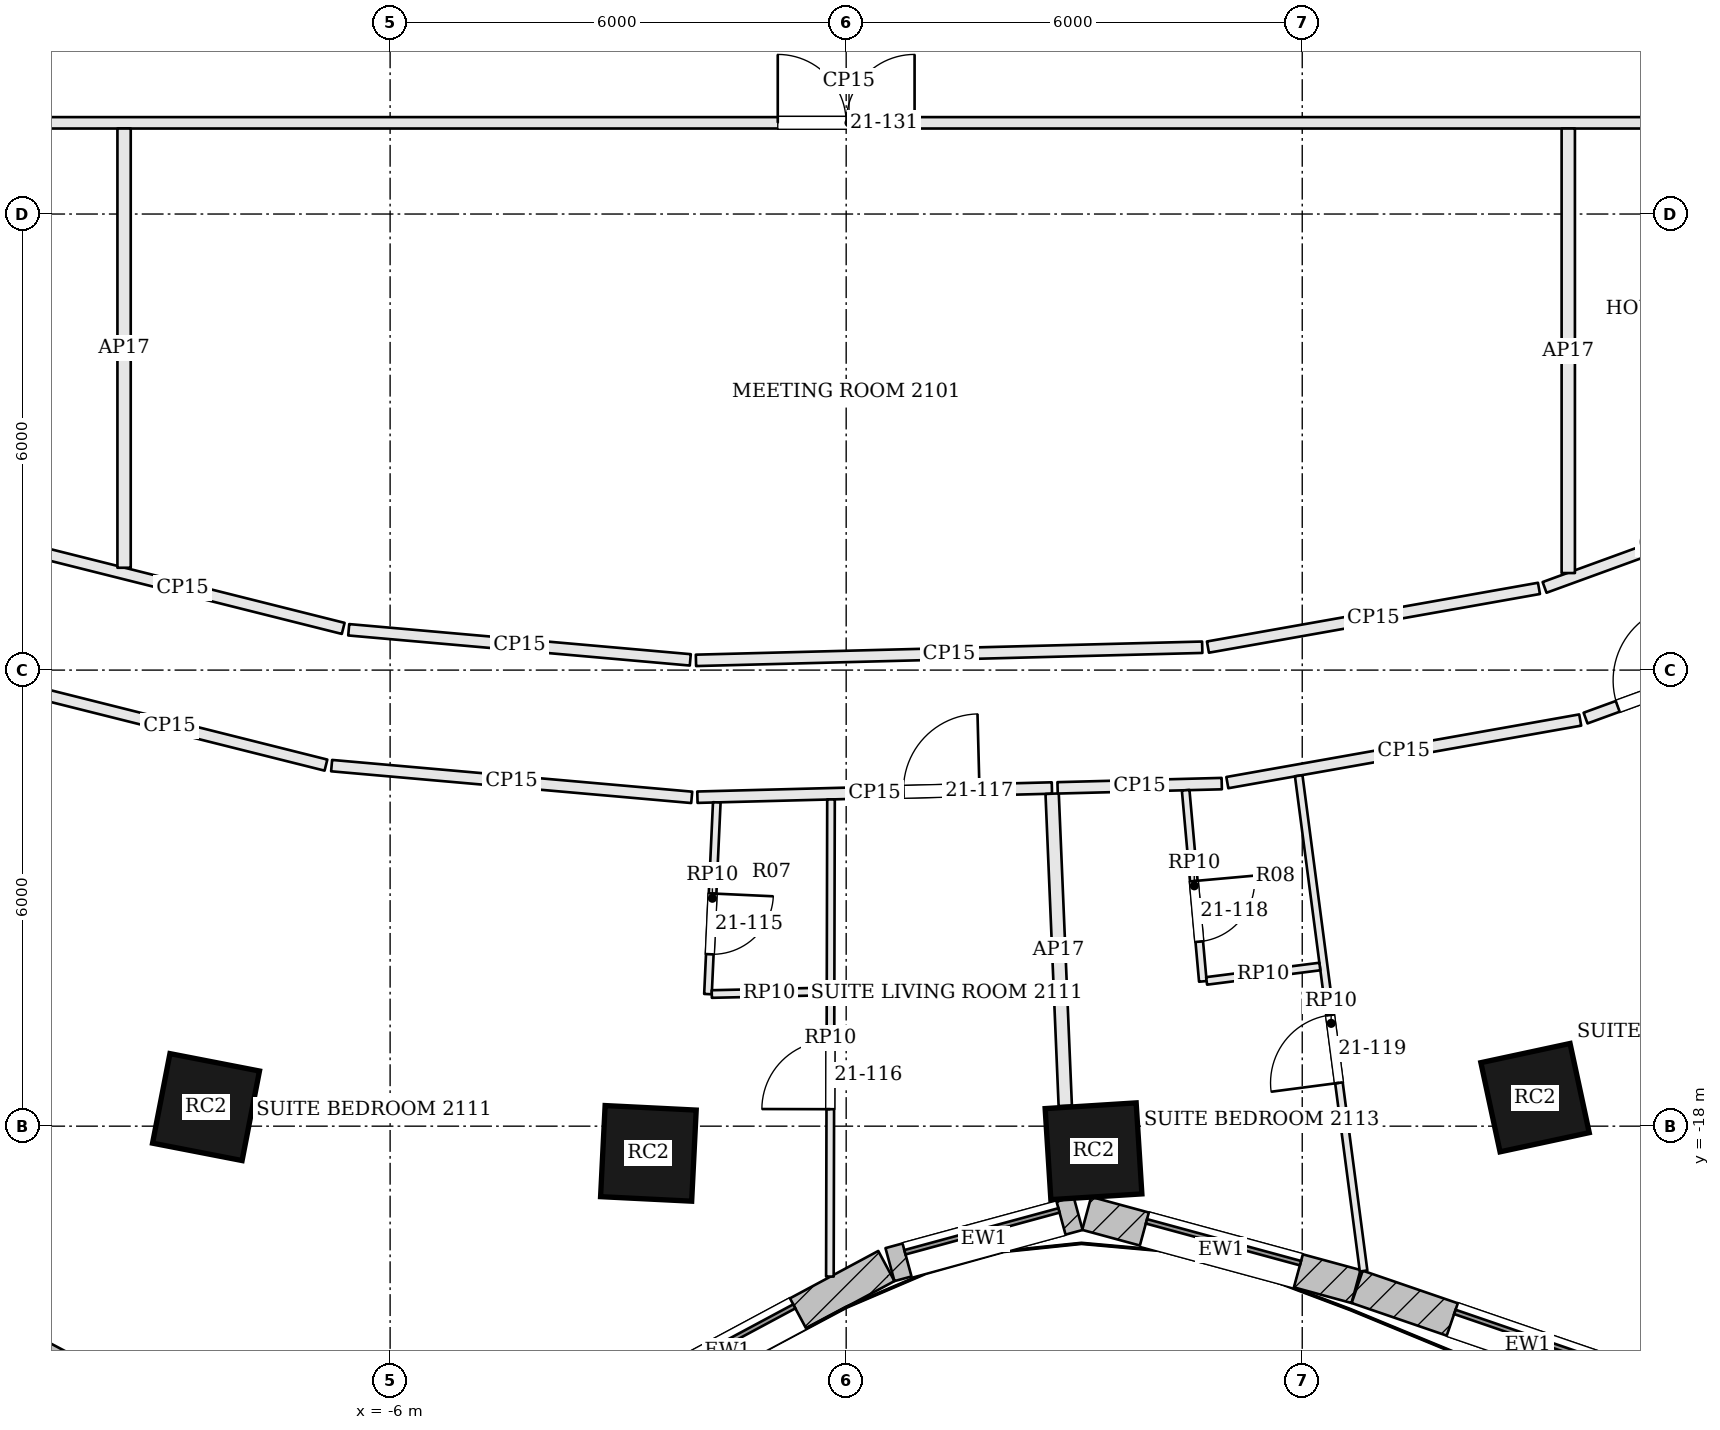
"""IFC4 building model, lengths in metres.
Left out: names, types, materials, properties, quantities, classifications, styles, units other than length and angle.
Written with IfcOpenShell. Run it as: python <this file> out.ifc"""

import sys

from ifc_helpers import new_model, si_unit, direction, frame, frame_2d, origin, origin_2d, place, context, subcontext, project, spatial, rectangle, extrude, element, fill, save


model = new_model("IFC4")
c1 = context("Model", 3, precision=1e-05, world=origin(), true_north=direction((0.0, 1.0)))
c2 = subcontext(c1, "Body", "Model", "MODEL_VIEW")
j1 = project(units=[si_unit("LENGTHUNIT", "METRE"), si_unit("PLANEANGLEUNIT", "RADIAN")], contexts=[c1])
p1 = place(None, origin())
s1 = spatial("IfcSite", under=j1, at=p1, CompositionType="ELEMENT")
p2 = place(p1, origin())
s2 = spatial("IfcBuilding", under=s1, at=p2, CompositionType="ELEMENT")
p3 = place(p2, frame((0.0, 0.0, 92.4)))
s3 = spatial("IfcBuildingStorey", under=s2, at=p3, CompositionType="ELEMENT", Elevation=92.4)
for number, where, z_axis, x_axis in (
    (1, (-8.422, -17.749, 0.0), (0.0, 0.0, 1.0), (0.982, -0.191, 0.0)),
    (2, (-2.602, -18.358, 0.0), (0.0, 0.0, 1.0), (0.999, -0.05, 0.0)),
    (3, (3.254, -18.33, 0.0), (0.0, 0.0, 1.0), (0.998, 0.063, 0.0)),
    (4, (9.063, -17.625, 0.0), (0.0, 0.0, 1.0), (0.978, 0.21, 0.0)),
):
    element("IfcColumn", number, at=place(p3, frame(where, z_axis=z_axis, x_axis=x_axis)), inside=s3, PredefinedType="COLUMN", context=c2, shape_type="SweptSolid", body=[
        extrude(rectangle(XDim=1.2, YDim=1.2, at=origin_2d()), origin(), (0.0, 0.0, 1.0), 3.6),
    ])
p4 = place(p3, frame((-10.693, -20.993, 0.0), z_axis=(0.0, 0.0, 1.0), x_axis=(0.883817790726, -0.46783128668, 0.0)))
e5 = element("IfcWall", 5, at=p4, inside=s3, PredefinedType="SOLIDWALL", context=c2, shape_type="SweptSolid", body=[
    extrude(rectangle(XDim=3.777, YDim=0.45, at=frame_2d((1.888, 0.0))), origin(), (0.0, 0.0, 1.0), 3.4),
])
p5 = place(p4, frame((0.838, 0.0, 0.9)))
e6 = element("IfcOpeningElement", 6, at=p5, cuts=e5, PredefinedType="OPENING", context=c2, shape_type="SweptSolid", body=[
    extrude(rectangle(XDim=2.1, YDim=2.0, at=frame_2d((1.05, 1.0))), frame((0.0, 0.235, 0.0), z_axis=(0.0, -1.0, 0.0), x_axis=(1.0, 0.0, 0.0)), (0.0, 0.0, 1.0), 0.47),
])
p6 = place(p3, frame((-3.646, -22.079, 0.0), z_axis=(0.0, 0.0, 1.0), x_axis=(0.881279133897, 0.472596115259, 0.0)))
e7 = element("IfcWall", 7, at=p6, inside=s3, PredefinedType="SOLIDWALL", context=c2, shape_type="SweptSolid", body=[
    extrude(rectangle(XDim=4.737, YDim=0.45, at=frame_2d((2.368, 0.0))), origin(), (0.0, 0.0, 1.0), 3.4),
])
p7 = place(p6, frame((1.318, 0.0, 0.9)))
e8 = element("IfcOpeningElement", 8, at=p7, cuts=e7, PredefinedType="OPENING", context=c2, shape_type="SweptSolid", body=[
    extrude(rectangle(XDim=2.1, YDim=2.0, at=frame_2d((1.05, 1.0))), frame((0.0, 0.235, 0.0), z_axis=(0.0, -1.0, 0.0), x_axis=(1.0, 0.0, 0.0)), (0.0, 0.0, 1.0), 0.47),
])
p8 = place(p3, frame((0.576, -19.821, 0.0), z_axis=(0.0, 0.0, 1.0), x_axis=(0.965009398019, 0.262215296532, 0.0)))
e9 = element("IfcWall", 9, at=p8, inside=s3, PredefinedType="SOLIDWALL", context=c2, shape_type="SweptSolid", body=[
    extrude(rectangle(XDim=2.565, YDim=0.45, at=frame_2d((1.283, 0.0))), origin(), (0.0, 0.0, 1.0), 3.4),
])
p9 = place(p8, frame((0.233, 0.0, 0.9)))
e10 = element("IfcOpeningElement", 10, at=p9, cuts=e9, PredefinedType="OPENING", context=c2, shape_type="SweptSolid", body=[
    extrude(rectangle(XDim=2.1, YDim=2.0, at=frame_2d((1.05, 1.0))), frame((0.0, 0.235, 0.0), z_axis=(0.0, -1.0, 0.0), x_axis=(1.0, 0.0, 0.0)), (0.0, 0.0, 1.0), 0.47),
])
p10 = place(p3, frame((3.164, -19.147, 0.0), z_axis=(0.0, 0.0, 1.0), x_axis=(0.965039479998, -0.262104563191, 0.0)))
e11 = element("IfcWall", 11, at=p10, inside=s3, PredefinedType="SOLIDWALL", context=c2, shape_type="SweptSolid", body=[
    extrude(rectangle(XDim=3.672, YDim=0.45, at=frame_2d((1.836, 0.0))), origin(), (0.0, 0.0, 1.0), 3.4),
])
p11 = place(p10, frame((0.786, 0.0, 0.9)))
e12 = element("IfcOpeningElement", 12, at=p11, cuts=e11, PredefinedType="OPENING", context=c2, shape_type="SweptSolid", body=[
    extrude(rectangle(XDim=2.1, YDim=2.0, at=frame_2d((1.05, 1.0))), frame((0.0, 0.235, 0.0), z_axis=(0.0, -1.0, 0.0), x_axis=(1.0, 0.0, 0.0)), (0.0, 0.0, 1.0), 0.47),
])
p12 = place(p3, frame((6.723, -20.114, 0.0), z_axis=(0.0, 0.0, 1.0), x_axis=(0.945947299026, -0.324320377815, 0.0)))
e13 = element("IfcWall", 13, at=p12, inside=s3, PredefinedType="SOLIDWALL", context=c2, shape_type="SweptSolid", body=[
    extrude(rectangle(XDim=4.745, YDim=0.45, at=frame_2d((2.372, 0.0))), origin(), (0.0, 0.0, 1.0), 3.4),
])
p13 = place(p12, frame((1.322, 0.0, 0.9)))
e14 = element("IfcOpeningElement", 14, at=p13, cuts=e13, PredefinedType="OPENING", context=c2, shape_type="SweptSolid", body=[
    extrude(rectangle(XDim=2.1, YDim=2.0, at=frame_2d((1.05, 1.0))), frame((0.0, 0.235, 0.0), z_axis=(0.0, -1.0, 0.0), x_axis=(1.0, 0.0, 0.0)), (0.0, 0.0, 1.0), 0.47),
])
p14 = place(p3, frame((-10.961, -12.218, 0.0), z_axis=(0.0, 0.0, 1.0), x_axis=(0.969990045386, -0.243144631551, 0.0)))
e15 = element("IfcWall", 15, at=p14, inside=s3, PredefinedType="PARTITIONING", context=c2, shape_type="SweptSolid", body=[
    extrude(rectangle(XDim=4.244, YDim=0.15, at=frame_2d((2.122, 0.0))), origin(), (0.0, 0.0, 1.0), 2.784),
])
p15 = place(p3, frame((-6.77, -13.257, 0.0), z_axis=(0.0, 0.0, 1.0), x_axis=(0.996139758015, -0.08778144737, 0.0)))
e16 = element("IfcWall", 16, at=p15, inside=s3, PredefinedType="PARTITIONING", context=c2, shape_type="SweptSolid", body=[
    extrude(rectangle(XDim=4.756, YDim=0.15, at=frame_2d((2.378, 0.0))), origin(), (0.0, 0.0, 1.0), 2.784),
])
p16 = place(p3, frame((-1.957, -13.672, 0.0), z_axis=(0.0, 0.0, 1.0), x_axis=(0.999664413823, 0.025904820691, 0.0)))
e17 = element("IfcWall", 17, at=p16, inside=s3, PredefinedType="PARTITIONING", context=c2, shape_type="SweptSolid", body=[
    extrude(rectangle(XDim=4.665, YDim=0.15, at=frame_2d((2.333, 0.0))), origin(), (0.0, 0.0, 1.0), 2.784),
])
p17 = place(p16, frame((2.712, 0.0, 0.0)))
e18 = element("IfcOpeningElement", 18, at=p17, cuts=e17, PredefinedType="OPENING", context=c2, shape_type="SweptSolid", body=[
    extrude(rectangle(XDim=1.0, YDim=2.1, at=frame_2d((0.5, 1.05))), frame((0.0, 0.085, 0.0), z_axis=(0.0, -1.0, 0.0), x_axis=(1.0, 0.0, 0.0)), (0.0, 0.0, 1.0), 0.17),
])
p18 = place(p3, frame((2.882, -17.732, 0.0), z_axis=(0.0, 0.0, 1.0), x_axis=(-0.042001196053, 0.999117560415, 0.0)))
e19 = element("IfcWall", 19, at=p18, inside=s3, PredefinedType="PARTITIONING", context=c2, shape_type="SweptSolid", body=[
    extrude(rectangle(XDim=4.11, YDim=0.175, at=frame_2d((2.055, 0.0))), origin(), (0.0, 0.0, 1.0), 2.784),
])
p19 = place(p3, frame((2.781, -13.549, 0.0), z_axis=(0.0, 0.0, 1.0), x_axis=(0.999665013714, 0.025881660615, 0.0)))
e20 = element("IfcWall", 20, at=p19, inside=s3, PredefinedType="PARTITIONING", context=c2, shape_type="SweptSolid", body=[
    extrude(rectangle(XDim=2.16, YDim=0.15, at=frame_2d((1.08, 0.0))), origin(), (0.0, 0.0, 1.0), 2.784),
])
p20 = place(p3, frame((5.015, -13.48, 0.0), z_axis=(0.0, 0.0, 1.0), x_axis=(0.984637772103, 0.174609443467, 0.0)))
e21 = element("IfcWall", 21, at=p20, inside=s3, PredefinedType="PARTITIONING", context=c2, shape_type="SweptSolid", body=[
    extrude(rectangle(XDim=4.715, YDim=0.15, at=frame_2d((2.357, 0.0))), origin(), (0.0, 0.0, 1.0), 2.784),
])
p21 = place(p3, frame((9.728, -12.631, 0.0), z_axis=(0.0, 0.0, 1.0), x_axis=(0.939626438181, 0.342201923826, 0.0)))
e22 = element("IfcWall", 22, at=p21, inside=s3, PredefinedType="PARTITIONING", context=c2, shape_type="SweptSolid", body=[
    extrude(rectangle(XDim=3.716, YDim=0.15, at=frame_2d((1.858, 0.0))), origin(), (0.0, 0.0, 1.0), 2.784),
])
p22 = place(p21, frame((0.45, 0.0, 0.0)))
e23 = element("IfcOpeningElement", 23, at=p22, cuts=e22, PredefinedType="OPENING", context=c2, shape_type="SweptSolid", body=[
    extrude(rectangle(XDim=1.0, YDim=2.1, at=frame_2d((0.5, 1.05))), frame((0.0, 0.085, 0.0), z_axis=(0.0, -1.0, 0.0), x_axis=(1.0, 0.0, 0.0)), (0.0, 0.0, 1.0), 0.17),
])
p23 = place(p3, frame((12.353, -9.76, 0.0), z_axis=(0.0, 0.0, 1.0), x_axis=(-0.939632450309, -0.342185415127, 0.0)))
e24 = element("IfcWall", 24, at=p23, inside=s3, PredefinedType="PARTITIONING", context=c2, shape_type="SweptSolid", body=[
    extrude(rectangle(XDim=3.368, YDim=0.15, at=frame_2d((1.684, 0.0))), origin(), (0.0, 0.0, 1.0), 2.784),
])
p24 = place(p3, frame((9.115, -10.925, 0.0), z_axis=(0.0, 0.0, 1.0), x_axis=(-0.984632605417, -0.174638576352, 0.0)))
e25 = element("IfcWall", 25, at=p24, inside=s3, PredefinedType="PARTITIONING", context=c2, shape_type="SweptSolid", body=[
    extrude(rectangle(XDim=4.423, YDim=0.15, at=frame_2d((2.211, 0.0))), origin(), (0.0, 0.0, 1.0), 2.784),
])
p25 = place(p3, frame((4.684, -11.699, 0.0), z_axis=(0.0, 0.0, 1.0), x_axis=(-0.999663438204, -0.025942442425, 0.0)))
e26 = element("IfcWall", 26, at=p25, inside=s3, PredefinedType="PARTITIONING", context=c2, shape_type="SweptSolid", body=[
    extrude(rectangle(XDim=6.663, YDim=0.15, at=frame_2d((3.332, 0.0))), origin(), (0.0, 0.0, 1.0), 2.784),
])
p26 = place(p3, frame((-2.051, -11.865, 0.0), z_axis=(0.0, 0.0, 1.0), x_axis=(-0.996139599493, 0.087783246245, 0.0)))
e27 = element("IfcWall", 27, at=p26, inside=s3, PredefinedType="PARTITIONING", context=c2, shape_type="SweptSolid", body=[
    extrude(rectangle(XDim=4.511, YDim=0.15, at=frame_2d((2.255, 0.0))), origin(), (0.0, 0.0, 1.0), 2.784),
])
p27 = place(p3, frame((-6.617, -11.451, 0.0), z_axis=(0.0, 0.0, 1.0), x_axis=(-0.969987441267, 0.243155020069, 0.0)))
e28 = element("IfcWall", 28, at=p27, inside=s3, PredefinedType="PARTITIONING", context=c2, shape_type="SweptSolid", body=[
    extrude(rectangle(XDim=4.359, YDim=0.15, at=frame_2d((2.179, 0.0))), origin(), (0.0, 0.0, 1.0), 2.784),
])
p28 = place(p3, frame((-14.725, -4.8, 0.0), z_axis=(0.0, 0.0, 1.0), x_axis=(1.0, 0.0, 0.0)))
e29 = element("IfcWall", 29, at=p28, inside=s3, PredefinedType="PARTITIONING", context=c2, shape_type="SweptSolid", body=[
    extrude(rectangle(XDim=29.525, YDim=0.15, at=frame_2d((14.763, 0.0))), origin(), (0.0, 0.0, 1.0), 2.784),
])
p29 = place(p28, frame((2.075, 0.0, 0.0)))
e30 = element("IfcOpeningElement", 30, at=p29, cuts=e29, PredefinedType="OPENING", context=c2, shape_type="SweptSolid", body=[
    extrude(rectangle(XDim=1.0, YDim=2.1, at=frame_2d((0.5, 1.05))), frame((0.0, 0.085, 0.0), z_axis=(0.0, -1.0, 0.0), x_axis=(1.0, 0.0, 0.0)), (0.0, 0.0, 1.0), 0.17),
])
p30 = place(p28, frame((13.825, 0.0, 0.0)))
e31 = element("IfcOpeningElement", 31, at=p30, cuts=e29, PredefinedType="OPENING", context=c2, shape_type="SweptSolid", body=[
    extrude(rectangle(XDim=1.8, YDim=2.1, at=frame_2d((0.9, 1.05))), frame((0.0, 0.085, 0.0), z_axis=(0.0, -1.0, 0.0), x_axis=(1.0, 0.0, 0.0)), (0.0, 0.0, 1.0), 0.17),
])
p31 = place(p28, frame((26.525, 0.0, 0.0)))
e32 = element("IfcOpeningElement", 32, at=p31, cuts=e29, PredefinedType="OPENING", context=c2, shape_type="SweptSolid", body=[
    extrude(rectangle(XDim=0.7, YDim=2.1, at=frame_2d((0.35, 1.05))), frame((0.0, 0.085, 0.0), z_axis=(0.0, -1.0, 0.0), x_axis=(1.0, 0.0, 0.0)), (0.0, 0.0, 1.0), 0.17),
])
p32 = place(p3, frame((-0.214, -19.979, 0.0), z_axis=(0.0, 0.0, 1.0), x_axis=(0.002333625165, 0.999997277093, 0.0)))
e33 = element("IfcWall", 33, at=p32, inside=s3, PredefinedType="PARTITIONING", context=c2, shape_type="SweptSolid", body=[
    extrude(rectangle(XDim=6.277, YDim=0.1, at=frame_2d((3.139, 0.0))), origin(), (0.0, 0.0, 1.0), 2.884),
])
p33 = place(p32, frame((2.202, 0.0, 0.0)))
e34 = element("IfcOpeningElement", 34, at=p33, cuts=e33, PredefinedType="OPENING", context=c2, shape_type="SweptSolid", body=[
    extrude(rectangle(XDim=0.9, YDim=2.4, at=frame_2d((0.45, 1.2))), frame((0.0, 0.06, 0.0), z_axis=(0.0, -1.0, 0.0), x_axis=(1.0, 0.0, 0.0)), (0.0, 0.0, 1.0), 0.12),
])
p34 = place(p3, frame((-1.702, -13.74, 0.0), z_axis=(0.0, 0.0, 1.0), x_axis=(-0.045833111847, -0.998949110745, 0.0)))
e35 = element("IfcWall", 35, at=p34, inside=s3, PredefinedType="PARTITIONING", context=c2, shape_type="SweptSolid", body=[
    extrude(rectangle(XDim=2.525, YDim=0.1, at=frame_2d((1.262, 0.0))), origin(), (0.0, 0.0, 1.0), 2.884),
])
p35 = place(p34, frame((1.2, 0.0, 0.0)))
e36 = element("IfcOpeningElement", 36, at=p35, cuts=e35, PredefinedType="OPENING", context=c2, shape_type="SweptSolid", body=[
    extrude(rectangle(XDim=0.8, YDim=2.1, at=frame_2d((0.4, 1.05))), frame((0.0, 0.06, 0.0), z_axis=(0.0, -1.0, 0.0), x_axis=(1.0, 0.0, 0.0)), (0.0, 0.0, 1.0), 0.12),
])
p36 = place(p3, frame((-1.768, -16.262, 0.0), z_axis=(0.0, 0.0, 1.0), x_axis=(0.999748456617, 0.022428185195, 0.0)))
e37 = element("IfcWall", 37, at=p36, inside=s3, PredefinedType="PARTITIONING", context=c2, shape_type="SweptSolid", body=[
    extrude(rectangle(XDim=1.513, YDim=0.1, at=frame_2d((0.757, 0.0))), origin(), (0.0, 0.0, 1.0), 2.884),
])
p37 = place(p3, frame((6.807, -19.905, 0.0), z_axis=(0.0, 0.0, 1.0), x_axis=(-0.129895112789, 0.991527740244, 0.0)))
e38 = element("IfcWall", 38, at=p37, inside=s3, PredefinedType="PARTITIONING", context=c2, shape_type="SweptSolid", body=[
    extrude(rectangle(XDim=6.571, YDim=0.1, at=frame_2d((3.285, 0.0))), origin(), (0.0, 0.0, 1.0), 2.884),
])
p38 = place(p37, frame((2.496, 0.0, 0.0)))
e39 = element("IfcOpeningElement", 39, at=p38, cuts=e38, PredefinedType="OPENING", context=c2, shape_type="SweptSolid", body=[
    extrude(rectangle(XDim=0.9, YDim=2.4, at=frame_2d((0.45, 1.2))), frame((0.0, 0.06, 0.0), z_axis=(0.0, -1.0, 0.0), x_axis=(1.0, 0.0, 0.0)), (0.0, 0.0, 1.0), 0.12),
])
p39 = place(p3, frame((4.466, -13.581, 0.0), z_axis=(0.0, 0.0, 1.0), x_axis=(0.089541778651, -0.995983067063, 0.0)))
e40 = element("IfcWall", 40, at=p39, inside=s3, PredefinedType="PARTITIONING", context=c2, shape_type="SweptSolid", body=[
    extrude(rectangle(XDim=2.525, YDim=0.1, at=frame_2d((1.262, 0.0))), origin(), (0.0, 0.0, 1.0), 2.884),
])
p40 = place(p39, frame((1.2, 0.0, 0.0)))
e41 = element("IfcOpeningElement", 41, at=p40, cuts=e40, PredefinedType="OPENING", context=c2, shape_type="SweptSolid", body=[
    extrude(rectangle(XDim=0.8, YDim=2.1, at=frame_2d((0.4, 1.05))), frame((0.0, 0.06, 0.0), z_axis=(0.0, -1.0, 0.0), x_axis=(1.0, 0.0, 0.0)), (0.0, 0.0, 1.0), 0.12),
])
p41 = place(p3, frame((4.742, -16.089, 0.0), z_axis=(0.0, 0.0, 1.0), x_axis=(0.992013080374, 0.126135040205, 0.0)))
e42 = element("IfcWall", 42, at=p41, inside=s3, PredefinedType="PARTITIONING", context=c2, shape_type="SweptSolid", body=[
    extrude(rectangle(XDim=1.502, YDim=0.1, at=frame_2d((0.751, 0.0))), origin(), (0.0, 0.0, 1.0), 2.884),
])
p42 = place(p3, frame((-9.5, -10.654, 0.0), z_axis=(0.0, 0.0, 1.0), x_axis=(0.0, 1.0, 0.0)))
e43 = element("IfcWall", 43, at=p42, inside=s3, PredefinedType="PARTITIONING", context=c2, shape_type="SweptSolid", body=[
    extrude(rectangle(XDim=5.779, YDim=0.175, at=frame_2d((2.889, 0.0))), origin(), (0.0, 0.0, 1.0), 2.784),
])
p43 = place(p3, frame((9.5, -10.723, 0.0), z_axis=(0.0, 0.0, 1.0), x_axis=(0.0, 1.0, 0.0)))
e44 = element("IfcWall", 44, at=p43, inside=s3, PredefinedType="PARTITIONING", context=c2, shape_type="SweptSolid", body=[
    extrude(rectangle(XDim=5.848, YDim=0.175, at=frame_2d((2.924, 0.0))), origin(), (0.0, 0.0, 1.0), 2.784),
])
p44 = place(p7, origin())
e45 = element("IfcWindow", 45, at=p44, inside=s3, PartitioningType="SINGLE_PANEL", PredefinedType="WINDOW", context=c2, shape_type="SweptSolid", body=[
    extrude(rectangle(XDim=2.1, YDim=2.0, at=frame_2d((1.05, 1.0))), frame((0.0, 0.135, 0.0), z_axis=(0.0, -1.0, 0.0), x_axis=(1.0, 0.0, 0.0)), (0.0, 0.0, 1.0), 0.06),
])
fill(e8, e45)
p45 = place(p9, origin())
e46 = element("IfcWindow", 46, at=p45, inside=s3, PartitioningType="SINGLE_PANEL", PredefinedType="WINDOW", context=c2, shape_type="SweptSolid", body=[
    extrude(rectangle(XDim=2.1, YDim=2.0, at=frame_2d((1.05, 1.0))), frame((0.0, 0.135, 0.0), z_axis=(0.0, -1.0, 0.0), x_axis=(1.0, 0.0, 0.0)), (0.0, 0.0, 1.0), 0.06),
])
fill(e10, e46)
p46 = place(p11, origin())
e47 = element("IfcWindow", 47, at=p46, inside=s3, PartitioningType="SINGLE_PANEL", PredefinedType="WINDOW", context=c2, shape_type="SweptSolid", body=[
    extrude(rectangle(XDim=2.1, YDim=2.0, at=frame_2d((1.05, 1.0))), frame((0.0, 0.135, 0.0), z_axis=(0.0, -1.0, 0.0), x_axis=(1.0, 0.0, 0.0)), (0.0, 0.0, 1.0), 0.06),
])
fill(e12, e47)
p47 = place(p13, origin())
e48 = element("IfcWindow", 48, at=p47, inside=s3, PartitioningType="SINGLE_PANEL", PredefinedType="WINDOW", context=c2, shape_type="SweptSolid", body=[
    extrude(rectangle(XDim=2.1, YDim=2.0, at=frame_2d((1.05, 1.0))), frame((0.0, 0.135, 0.0), z_axis=(0.0, -1.0, 0.0), x_axis=(1.0, 0.0, 0.0)), (0.0, 0.0, 1.0), 0.06),
])
fill(e14, e48)
p48 = place(p35, origin())
e49 = element("IfcDoor", 49, at=p48, inside=s3, OperationType="SINGLE_SWING_LEFT", PredefinedType="DOOR", context=c2, shape_type="SweptSolid", body=[
    extrude(rectangle(XDim=0.8, YDim=2.1, at=frame_2d((0.4, 1.05))), frame((0.0, 0.025, 0.0), z_axis=(0.0, -1.0, 0.0), x_axis=(1.0, 0.0, 0.0)), (0.0, 0.0, 1.0), 0.05),
])
fill(e36, e49)
p49 = place(p33, origin())
e50 = element("IfcDoor", 50, at=p49, inside=s3, OperationType="SINGLE_SWING_LEFT", PredefinedType="DOOR", context=c2, shape_type="SweptSolid", body=[
    extrude(rectangle(XDim=0.9, YDim=2.4, at=frame_2d((0.45, 1.2))), frame((0.0, 0.025, 0.0), z_axis=(0.0, -1.0, 0.0), x_axis=(1.0, 0.0, 0.0)), (0.0, 0.0, 1.0), 0.05),
])
fill(e34, e50)
p50 = place(p17, origin())
e51 = element("IfcDoor", 51, at=p50, inside=s3, OperationType="SINGLE_SWING_RIGHT", PredefinedType="DOOR", context=c2, shape_type="SweptSolid", body=[
    extrude(rectangle(XDim=1.0, YDim=2.1, at=frame_2d((0.5, 1.05))), frame((0.0, 0.025, 0.0), z_axis=(0.0, -1.0, 0.0), x_axis=(1.0, 0.0, 0.0)), (0.0, 0.0, 1.0), 0.05),
])
fill(e18, e51)
p51 = place(p40, origin())
e52 = element("IfcDoor", 52, at=p51, inside=s3, OperationType="SINGLE_SWING_LEFT", PredefinedType="DOOR", context=c2, shape_type="SweptSolid", body=[
    extrude(rectangle(XDim=0.8, YDim=2.1, at=frame_2d((0.4, 1.05))), frame((0.0, 0.025, 0.0), z_axis=(0.0, -1.0, 0.0), x_axis=(1.0, 0.0, 0.0)), (0.0, 0.0, 1.0), 0.05),
])
fill(e41, e52)
p52 = place(p38, origin())
e53 = element("IfcDoor", 53, at=p52, inside=s3, OperationType="SINGLE_SWING_LEFT", PredefinedType="DOOR", context=c2, shape_type="SweptSolid", body=[
    extrude(rectangle(XDim=0.9, YDim=2.4, at=frame_2d((0.45, 1.2))), frame((0.0, 0.025, 0.0), z_axis=(0.0, -1.0, 0.0), x_axis=(1.0, 0.0, 0.0)), (0.0, 0.0, 1.0), 0.05),
])
fill(e39, e53)
p53 = place(p22, origin())
e54 = element("IfcDoor", 54, at=p53, inside=s3, OperationType="SINGLE_SWING_RIGHT", PredefinedType="DOOR", context=c2, shape_type="SweptSolid", body=[
    extrude(rectangle(XDim=1.0, YDim=2.1, at=frame_2d((0.5, 1.05))), frame((0.0, 0.025, 0.0), z_axis=(0.0, -1.0, 0.0), x_axis=(1.0, 0.0, 0.0)), (0.0, 0.0, 1.0), 0.05),
])
fill(e23, e54)
p54 = place(p30, origin())
e55 = element("IfcDoor", 55, at=p54, inside=s3, OperationType="DOUBLE_DOOR_SINGLE_SWING", PredefinedType="DOOR", context=c2, shape_type="SweptSolid", body=[
    extrude(rectangle(XDim=1.8, YDim=2.1, at=frame_2d((0.9, 1.05))), frame((0.0, 0.025, 0.0), z_axis=(0.0, -1.0, 0.0), x_axis=(1.0, 0.0, 0.0)), (0.0, 0.0, 1.0), 0.05),
])
fill(e31, e55)
save(model, sys.argv[1])
